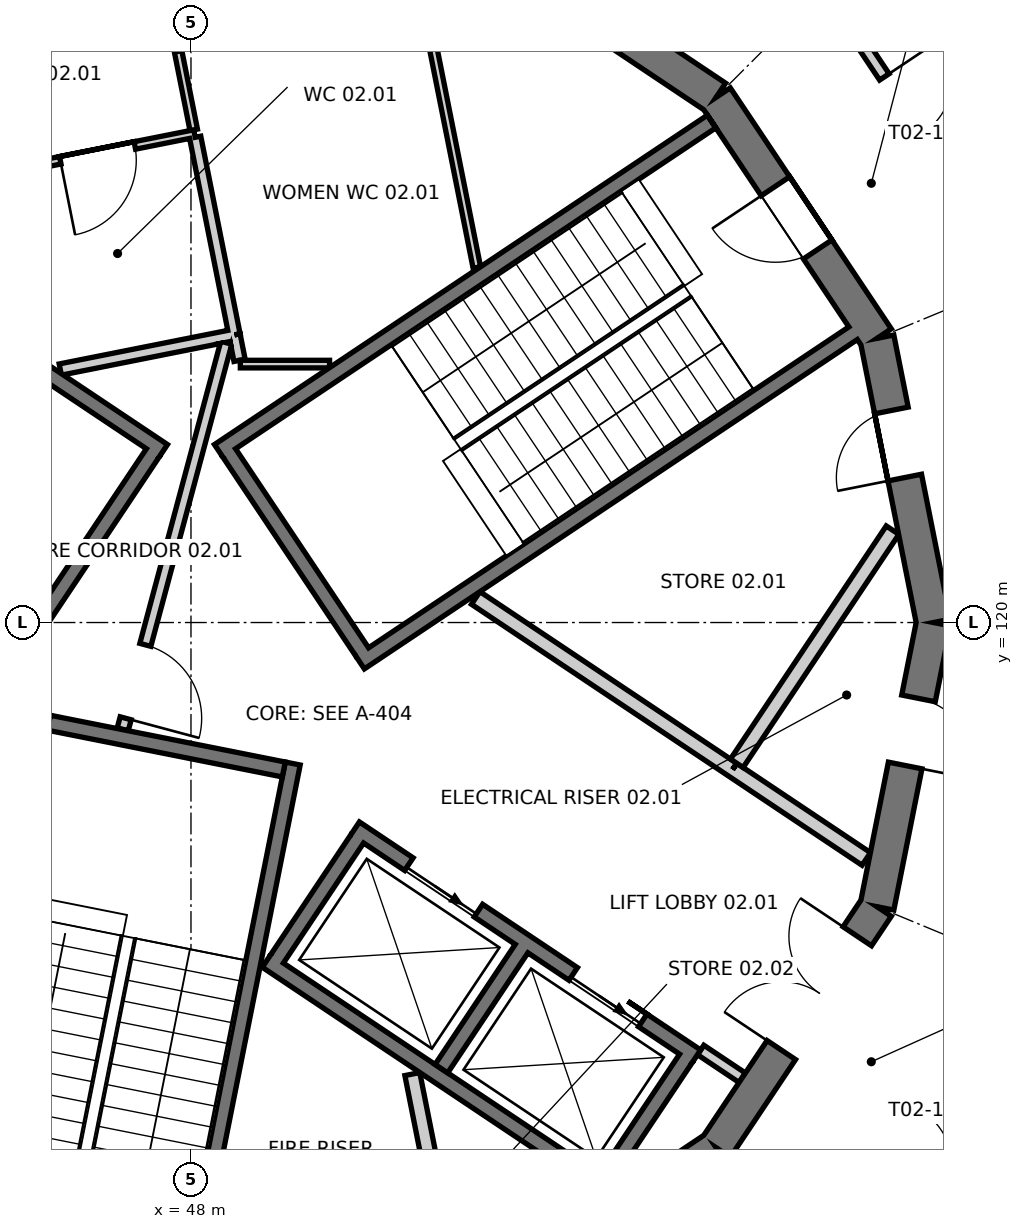
"""IFC4 building model, lengths in metres.
Left out: names, types, materials, properties, quantities, classifications, styles, units other than length and angle.
Written with IfcOpenShell. Run it as: python <this file> out.ifc"""

import sys

from ifc_helpers import new_model, si_unit, direction, frame, frame_2d, origin, place, context, subcontext, project, spatial, polyline, rectangle, outline, extrude, element, fill, save


model = new_model("IFC4")
c1 = context("Model", 3, precision=1e-05, world=origin(), true_north=direction((0.0, 1.0)))
c2 = subcontext(c1, "Body", "Model", "MODEL_VIEW")
j1 = project(units=[si_unit("LENGTHUNIT", "METRE"), si_unit("PLANEANGLEUNIT", "RADIAN")], contexts=[c1])
p1 = place(None, origin())
s1 = spatial("IfcSite", under=j1, at=p1, CompositionType="ELEMENT")
p2 = place(p1, origin())
s2 = spatial("IfcBuilding", under=s1, at=p2, CompositionType="ELEMENT")
p3 = place(p2, frame((0.0, 0.0, 10.8)))
s3 = spatial("IfcBuildingStorey", under=s2, at=p3, CompositionType="ELEMENT", Elevation=10.8)
p4 = place(p3, frame((57.771, 120.0, 0.0), z_axis=(0.0, 0.0, 1.0), x_axis=(-0.195069197673, 0.98078948206, 0.0)))
e1 = element("IfcWall", 1, at=p4, inside=s3, PredefinedType="SHEAR", context=c2, shape_type="SweptSolid", body=[
    extrude(outline(polyline([(-0.045, -0.225), (3.857, -0.225), (3.768, 0.225), (0.045, 0.225), (-0.045, -0.225)])), origin(), (0.0, 0.0, 1.0), 4.8),
])
p5 = place(p4, frame((1.945, 0.0, 0.0)))
e2 = element("IfcOpeningElement", 2, at=p5, cuts=e1, PredefinedType="OPENING", context=c2, shape_type="SweptSolid", body=[
    extrude(rectangle(XDim=0.9, YDim=2.1, at=frame_2d((0.45, 1.05))), frame((0.0, 0.235, 0.0), z_axis=(0.0, -1.0, 0.0), x_axis=(1.0, 0.0, 0.0)), (0.0, 0.0, 1.0), 0.47),
])
p6 = place(p3, frame((57.027, 123.739, 0.0), z_axis=(0.0, 0.0, 1.0), x_axis=(-0.555542277102, 0.83148829117, 0.0)))
e3 = element("IfcWall", 3, at=p6, inside=s3, PredefinedType="SHEAR", context=c2, shape_type="SweptSolid", body=[
    extrude(outline(polyline([(-0.045, -0.225), (3.857, -0.225), (3.768, 0.225), (0.045, 0.225), (-0.045, -0.225)])), origin(), (0.0, 0.0, 1.0), 4.8),
])
p7 = place(p6, frame((1.406, 0.0, 0.0)))
e4 = element("IfcOpeningElement", 4, at=p7, cuts=e3, PredefinedType="OPENING", context=c2, shape_type="SweptSolid", body=[
    extrude(rectangle(XDim=1.0, YDim=2.1, at=frame_2d((0.5, 1.05))), frame((0.0, 0.235, 0.0), z_axis=(0.0, -1.0, 0.0), x_axis=(1.0, 0.0, 0.0)), (0.0, 0.0, 1.0), 0.47),
])
p8 = place(p3, frame((54.909, 126.909, 0.0), z_axis=(0.0, 0.0, 1.0), x_axis=(-0.83148829117, 0.555542277102, 0.0)))
e5 = element("IfcWall", 5, at=p8, inside=s3, PredefinedType="SHEAR", context=c2, shape_type="SweptSolid", body=[
    extrude(outline(polyline([(-0.045, -0.225), (3.857, -0.225), (3.768, 0.225), (0.045, 0.225), (-0.045, -0.225)])), origin(), (0.0, 0.0, 1.0), 4.8),
])
p9 = place(p8, frame((1.545, 0.0, 0.0)))
e6 = element("IfcOpeningElement", 6, at=p9, cuts=e5, PredefinedType="OPENING", context=c2, shape_type="SweptSolid", body=[
    extrude(rectangle(XDim=0.9, YDim=2.1, at=frame_2d((0.45, 1.05))), frame((0.0, 0.235, 0.0), z_axis=(0.0, -1.0, 0.0), x_axis=(1.0, 0.0, 0.0)), (0.0, 0.0, 1.0), 0.47),
])
p10 = place(p3, frame((51.739, 110.973, 0.0), z_axis=(0.0, 0.0, 1.0), x_axis=(0.83148829117, 0.555542277102, 0.0)))
e7 = element("IfcWall", 7, at=p10, inside=s3, PredefinedType="SHEAR", context=c2, shape_type="SweptSolid", body=[
    extrude(outline(polyline([(-0.045, -0.225), (3.857, -0.225), (3.768, 0.225), (0.045, 0.225), (-0.045, -0.225)])), origin(), (0.0, 0.0, 1.0), 4.8),
])
p11 = place(p10, frame((0.645, 0.0, 0.0)))
e8 = element("IfcOpeningElement", 8, at=p11, cuts=e7, PredefinedType="OPENING", context=c2, shape_type="SweptSolid", body=[
    extrude(rectangle(XDim=0.9, YDim=2.1, at=frame_2d((0.45, 1.05))), frame((0.0, 0.235, 0.0), z_axis=(0.0, -1.0, 0.0), x_axis=(1.0, 0.0, 0.0)), (0.0, 0.0, 1.0), 0.47),
])
p12 = place(p3, frame((54.909, 113.091, 0.0), z_axis=(0.0, 0.0, 1.0), x_axis=(0.555542277102, 0.83148829117, 0.0)))
e9 = element("IfcWall", 9, at=p12, inside=s3, PredefinedType="SHEAR", context=c2, shape_type="SweptSolid", body=[
    extrude(outline(polyline([(-0.045, -0.225), (3.857, -0.225), (3.768, 0.225), (0.045, 0.225), (-0.045, -0.225)])), origin(), (0.0, 0.0, 1.0), 4.8),
])
p13 = place(p12, frame((1.545, 0.0, 0.0)))
e10 = element("IfcOpeningElement", 10, at=p13, cuts=e9, PredefinedType="OPENING", context=c2, shape_type="SweptSolid", body=[
    extrude(rectangle(XDim=1.8, YDim=2.1, at=frame_2d((0.9, 1.05))), frame((0.0, 0.235, 0.0), z_axis=(0.0, -1.0, 0.0), x_axis=(1.0, 0.0, 0.0)), (0.0, 0.0, 1.0), 0.47),
])
p14 = place(p3, frame((57.027, 116.261, 0.0), z_axis=(0.0, 0.0, 1.0), x_axis=(0.195069197673, 0.98078948206, 0.0)))
e11 = element("IfcWall", 11, at=p14, inside=s3, PredefinedType="SHEAR", context=c2, shape_type="SweptSolid", body=[
    extrude(outline(polyline([(-0.045, -0.225), (3.857, -0.225), (3.768, 0.225), (0.045, 0.225), (-0.045, -0.225)])), origin(), (0.0, 0.0, 1.0), 4.8),
])
p15 = place(p14, frame((1.895, 0.0, 0.0)))
e12 = element("IfcOpeningElement", 12, at=p15, cuts=e11, PredefinedType="OPENING", context=c2, shape_type="SweptSolid", body=[
    extrude(rectangle(XDim=0.9, YDim=2.1, at=frame_2d((0.45, 1.05))), frame((0.0, 0.235, 0.0), z_axis=(0.0, -1.0, 0.0), x_axis=(1.0, 0.0, 0.0)), (0.0, 0.0, 1.0), 0.47),
])
p16 = place(p3, frame((48.365, 122.258, 0.0), z_axis=(0.0, 0.0, 1.0), x_axis=(0.831476803301, 0.555559470779, 0.0)))
e13 = element("IfcWall", 13, at=p16, inside=s3, PredefinedType="SHEAR", context=c2, shape_type="SweptSolid", body=[
    extrude(rectangle(XDim=7.8, YDim=0.2, at=frame_2d((3.9, 0.0))), origin(), (0.0, 0.0, 1.0), 4.8),
])
p17 = place(p3, frame((50.226, 119.473, 0.0), z_axis=(0.0, 0.0, 1.0), x_axis=(0.831486463828, 0.555545012102, 0.0)))
e14 = element("IfcWall", 14, at=p17, inside=s3, PredefinedType="SHEAR", context=c2, shape_type="SweptSolid", body=[
    extrude(rectangle(XDim=7.8, YDim=0.2, at=frame_2d((3.9, 0.0))), origin(), (0.0, 0.0, 1.0), 4.8),
])
p18 = place(p3, frame((50.253, 119.612, 0.0), z_axis=(0.0, 0.0, 1.0), x_axis=(-0.55555842186, 0.831477504146, 0.0)))
e15 = element("IfcWall", 15, at=p18, inside=s3, PredefinedType="SHEAR", context=c2, shape_type="SweptSolid", body=[
    extrude(rectangle(XDim=3.15, YDim=0.2, at=frame_2d((1.575, 0.0))), origin(), (0.0, 0.0, 1.0), 4.8),
])
p19 = place(p3, frame((47.635, 122.258, 0.0), z_axis=(0.0, 0.0, 1.0), x_axis=(-0.831476803301, 0.555559470779, 0.0)))
e16 = element("IfcWall", 16, at=p19, inside=s3, PredefinedType="SHEAR", context=c2, shape_type="SweptSolid", body=[
    extrude(rectangle(XDim=7.8, YDim=0.2, at=frame_2d((3.9, 0.0))), origin(), (0.0, 0.0, 1.0), 4.8),
])
p20 = place(p3, frame((47.497, 122.231, 0.0), z_axis=(0.0, 0.0, 1.0), x_axis=(-0.55555842186, -0.831477504146, 0.0)))
e17 = element("IfcWall", 17, at=p20, inside=s3, PredefinedType="SHEAR", context=c2, shape_type="SweptSolid", body=[
    extrude(rectangle(XDim=3.15, YDim=0.2, at=frame_2d((1.575, 0.0))), origin(), (0.0, 0.0, 1.0), 4.8),
])
p21 = place(p3, frame((49.339, 118.145, 0.0), z_axis=(0.0, 0.0, 1.0), x_axis=(-0.195092759861, -0.980784795483, 0.0)))
e18 = element("IfcWall", 18, at=p21, inside=s3, PredefinedType="SHEAR", context=c2, shape_type="SweptSolid", body=[
    extrude(rectangle(XDim=7.8, YDim=0.2, at=frame_2d((3.9, 0.0))), origin(), (0.0, 0.0, 1.0), 4.8),
])
p22 = place(p3, frame((46.132, 118.681, 0.0), z_axis=(0.0, 0.0, 1.0), x_axis=(0.980785830564, -0.195087556151, 0.0)))
e19 = element("IfcWall", 19, at=p22, inside=s3, PredefinedType="SHEAR", context=c2, shape_type="SweptSolid", body=[
    extrude(rectangle(XDim=3.15, YDim=0.2, at=frame_2d((1.575, 0.0))), origin(), (0.0, 0.0, 1.0), 4.8),
])
p23 = place(p3, frame((50.16, 117.293, 0.0), z_axis=(0.0, 0.0, 1.0), x_axis=(0.831479497601, -0.55555543834, 0.0)))
e20 = element("IfcWall", 20, at=p23, inside=s3, PredefinedType="SHEAR", context=c2, shape_type="SweptSolid", body=[
    extrude(rectangle(XDim=5.4, YDim=0.2, at=frame_2d((2.7, 0.0))), origin(), (0.0, 0.0, 1.0), 4.8),
])
p24 = place(p23, frame((0.85, 0.0, 0.0)))
e21 = element("IfcOpeningElement", 21, at=p24, cuts=e20, PredefinedType="OPENING", context=c2, shape_type="SweptSolid", body=[
    extrude(rectangle(XDim=1.1, YDim=2.1, at=frame_2d((0.55, 1.05))), frame((0.0, 0.11, 0.0), z_axis=(0.0, -1.0, 0.0), x_axis=(1.0, 0.0, 0.0)), (0.0, 0.0, 1.0), 0.22),
])
p25 = place(p23, frame((3.45, 0.0, 0.0)))
e22 = element("IfcOpeningElement", 22, at=p25, cuts=e20, PredefinedType="OPENING", context=c2, shape_type="SweptSolid", body=[
    extrude(rectangle(XDim=1.1, YDim=2.1, at=frame_2d((0.55, 1.05))), frame((0.0, 0.11, 0.0), z_axis=(0.0, -1.0, 0.0), x_axis=(1.0, 0.0, 0.0)), (0.0, 0.0, 1.0), 0.22),
])
p26 = place(p3, frame((48.994, 115.548, 0.0), z_axis=(0.0, 0.0, 1.0), x_axis=(0.831444656906, -0.555607579593, 0.0)))
e23 = element("IfcWall", 23, at=p26, inside=s3, PredefinedType="SHEAR", context=c2, shape_type="SweptSolid", body=[
    extrude(rectangle(XDim=5.4, YDim=0.2, at=frame_2d((2.7, 0.0))), origin(), (0.0, 0.0, 1.0), 4.8),
])
p27 = place(p3, frame((50.188, 117.155, 0.0), z_axis=(0.0, 0.0, 1.0), x_axis=(-0.555559945722, -0.831476485963, 0.0)))
e24 = element("IfcWall", 24, at=p27, inside=s3, PredefinedType="SHEAR", context=c2, shape_type="SweptSolid", body=[
    extrude(rectangle(XDim=1.9, YDim=0.2, at=frame_2d((0.95, 0.0))), origin(), (0.0, 0.0, 1.0), 4.8),
])
p28 = place(p3, frame((52.35, 115.71, 0.0), z_axis=(0.0, 0.0, 1.0), x_axis=(-0.55550058618, -0.831516144614, 0.0)))
e25 = element("IfcWall", 25, at=p28, inside=s3, PredefinedType="SHEAR", context=c2, shape_type="SweptSolid", body=[
    extrude(rectangle(XDim=1.9, YDim=0.2, at=frame_2d((0.95, 0.0))), origin(), (0.0, 0.0, 1.0), 4.8),
])
p29 = place(p3, frame((54.512, 114.266, 0.0), z_axis=(0.0, 0.0, 1.0), x_axis=(-0.555589423235, -0.83145678949, 0.0)))
e26 = element("IfcWall", 26, at=p29, inside=s3, PredefinedType="SHEAR", context=c2, shape_type="SweptSolid", body=[
    extrude(rectangle(XDim=1.9, YDim=0.2, at=frame_2d((0.95, 0.0))), origin(), (0.0, 0.0, 1.0), 4.8),
])
p30 = place(p3, frame((55.126, 118.065, 0.0), z_axis=(0.0, 0.0, 1.0), x_axis=(-0.831495502265, 0.555531483998, 0.0)))
e27 = element("IfcWall", 27, at=p30, inside=s3, PredefinedType="SOLIDWALL", context=c2, shape_type="SweptSolid", body=[
    extrude(rectangle(XDim=4.065, YDim=0.2, at=frame_2d((2.033, 0.0))), origin(), (0.0, 0.0, 1.0), 4.52),
])
p31 = place(p3, frame((57.231, 121.215, 0.0), z_axis=(0.0, 0.0, 1.0), x_axis=(-0.555600969312, -0.831449074147, 0.0)))
e28 = element("IfcWall", 28, at=p31, inside=s3, PredefinedType="SOLIDWALL", context=c2, shape_type="SweptSolid", body=[
    extrude(rectangle(XDim=3.689, YDim=0.2, at=frame_2d((1.844, 0.0))), origin(), (0.0, 0.0, 1.0), 4.52),
])
p32 = place(p3, frame((56.885, 116.89, 0.0), z_axis=(0.0, 0.0, 1.0), x_axis=(-0.831446094913, 0.555605427667, 0.0)))
e29 = element("IfcWall", 29, at=p32, inside=s3, PredefinedType="SOLIDWALL", context=c2, shape_type="SweptSolid", body=[
    extrude(rectangle(XDim=2.115, YDim=0.2, at=frame_2d((1.058, 0.0))), origin(), (0.0, 0.0, 1.0), 4.52),
])
p33 = place(p3, frame((48.046, 126.433, 0.0), z_axis=(0.0, 0.0, 1.0), x_axis=(-0.980778805994, -0.195122868248, 0.0)))
e30 = element("IfcWall", 30, at=p33, inside=s3, PredefinedType="PARTITIONING", context=c2, shape_type="SweptSolid", body=[
    extrude(rectangle(XDim=2.6, YDim=0.1, at=frame_2d((1.3, 0.0))), origin(), (0.0, 0.0, 1.0), 4.52),
])
p34 = place(p33, frame((0.8, 0.0, 0.0)))
e31 = element("IfcOpeningElement", 31, at=p34, cuts=e30, PredefinedType="OPENING", context=c2, shape_type="SweptSolid", body=[
    extrude(rectangle(XDim=1.0, YDim=2.1, at=frame_2d((0.5, 1.05))), frame((0.0, 0.06, 0.0), z_axis=(0.0, -1.0, 0.0), x_axis=(1.0, 0.0, 0.0)), (0.0, 0.0, 1.0), 0.12),
])
p35 = place(p3, frame((47.449, 129.432, 0.0), z_axis=(0.0, 0.0, 1.0), x_axis=(0.195054549846, -0.980792395252, 0.0)))
e32 = element("IfcWall", 32, at=p35, inside=s3, PredefinedType="PARTITIONING", context=c2, shape_type="SweptSolid", body=[
    extrude(rectangle(XDim=3.008, YDim=0.1, at=frame_2d((1.504, 0.0))), origin(), (0.0, 0.0, 1.0), 4.52),
])
p36 = place(p35, frame((1.054, 0.0, 0.0)))
e33 = element("IfcOpeningElement", 33, at=p36, cuts=e32, PredefinedType="OPENING", context=c2, shape_type="SweptSolid", body=[
    extrude(rectangle(XDim=0.9, YDim=2.1, at=frame_2d((0.45, 1.05))), frame((0.0, 0.06, 0.0), z_axis=(0.0, -1.0, 0.0), x_axis=(1.0, 0.0, 0.0)), (0.0, 0.0, 1.0), 0.12),
])
p37 = place(p3, frame((48.056, 126.384, 0.0), z_axis=(0.0, 0.0, 1.0), x_axis=(0.195123903338, -0.980778600065, 0.0)))
e34 = element("IfcWall", 34, at=p37, inside=s3, PredefinedType="PARTITIONING", context=c2, shape_type="SweptSolid", body=[
    extrude(rectangle(XDim=2.65, YDim=0.15, at=frame_2d((1.325, 0.0))), origin(), (0.0, 0.0, 1.0), 4.52),
])
p38 = place(p3, frame((48.524, 123.775, 0.0), z_axis=(0.0, 0.0, 1.0), x_axis=(-0.980777249161, -0.195130693455, 0.0)))
e35 = element("IfcWall", 35, at=p38, inside=s3, PredefinedType="PARTITIONING", context=c2, shape_type="SweptSolid", body=[
    extrude(rectangle(XDim=2.287, YDim=0.15, at=frame_2d((1.144, 0.0))), origin(), (0.0, 0.0, 1.0), 4.52),
])
p39 = place(p3, frame((50.911, 128.943, 0.0), z_axis=(0.0, 0.0, 1.0), x_axis=(0.195113868301, -0.980780596462, 0.0)))
e36 = element("IfcWall", 36, at=p39, inside=s3, PredefinedType="PARTITIONING", context=c2, shape_type="SweptSolid", body=[
    extrude(rectangle(XDim=4.357, YDim=0.1, at=frame_2d((2.178, 0.0))), origin(), (0.0, 0.0, 1.0), 4.52),
])
p40 = place(p3, frame((49.823, 123.4, 0.0), z_axis=(0.0, 0.0, 1.0), x_axis=(-1.0, 0.0, 0.0)))
e37 = element("IfcWall", 37, at=p40, inside=s3, PredefinedType="PARTITIONING", context=c2, shape_type="SweptSolid", body=[
    extrude(rectangle(XDim=1.174, YDim=0.1, at=frame_2d((0.587, 0.0))), origin(), (0.0, 0.0, 1.0), 4.52),
])
p41 = place(p3, frame((48.639, 123.449, 0.0), z_axis=(0.0, 0.0, 1.0), x_axis=(-0.194880473507, 0.98082699853, 0.0)))
e38 = element("IfcWall", 38, at=p41, inside=s3, PredefinedType="PARTITIONING", context=c2, shape_type="SweptSolid", body=[
    extrude(rectangle(XDim=0.342, YDim=0.15, at=frame_2d((0.171, 0.0))), origin(), (0.0, 0.0, 1.0), 4.52),
])
p42 = place(p3, frame((50.912, 114.059, 0.0), z_axis=(0.0, 0.0, 1.0), x_axis=(0.195101986683, -0.980782960085, 0.0)))
e39 = element("IfcWall", 39, at=p42, inside=s3, PredefinedType="SOLIDWALL", context=c2, shape_type="SweptSolid", body=[
    extrude(rectangle(XDim=2.963, YDim=0.2, at=frame_2d((1.481, 0.0))), origin(), (0.0, 0.0, 1.0), 4.52),
])
p43 = place(p3, frame((54.706, 114.377, 0.0), z_axis=(0.0, 0.0, 1.0), x_axis=(0.831421626399, -0.555642042286, 0.0)))
e40 = element("IfcWall", 40, at=p43, inside=s3, PredefinedType="PARTITIONING", context=c2, shape_type="SweptSolid", body=[
    extrude(rectangle(XDim=0.658, YDim=0.15, at=frame_2d((0.329, 0.0))), origin(), (0.0, 0.0, 1.0), 4.52),
])
p44 = place(p3, frame((47.102, 118.595, 0.0), z_axis=(0.0, 0.0, 1.0), x_axis=(0.258814124304, 0.9659271448, 0.0)))
e41 = element("IfcWall", 41, at=p44, inside=s3, PredefinedType="PARTITIONING", context=c2, shape_type="SweptSolid", body=[
    extrude(rectangle(XDim=5.265, YDim=0.15, at=frame_2d((2.632, 0.0))), origin(), (0.0, 0.0, 1.0), 4.52),
])
p45 = place(p44, frame((0.15, 0.0, 0.0)))
e42 = element("IfcOpeningElement", 42, at=p45, cuts=e41, PredefinedType="OPENING", context=c2, shape_type="SweptSolid", body=[
    extrude(rectangle(XDim=1.0, YDim=2.1, at=frame_2d((0.5, 1.05))), frame((0.0, 0.085, 0.0), z_axis=(0.0, -1.0, 0.0), x_axis=(1.0, 0.0, 0.0)), (0.0, 0.0, 1.0), 0.17),
])
p46 = place(p3, frame((56.344, 128.344, 0.0), z_axis=(0.0, 0.0, 1.0), x_axis=(0.555544233776, -0.831486983854, 0.0)))
e43 = element("IfcWall", 43, at=p46, inside=s3, PredefinedType="PARTITIONING", context=c2, shape_type="SweptSolid", body=[
    extrude(rectangle(XDim=4.604, YDim=0.15, at=frame_2d((2.302, 0.0))), origin(), (0.0, 0.0, 1.0), 4.52),
])
p47 = place(p46, frame((1.402, 0.0, 0.0)))
e44 = element("IfcOpeningElement", 44, at=p47, cuts=e43, PredefinedType="OPENING", context=c2, shape_type="SweptSolid", body=[
    extrude(rectangle(XDim=1.8, YDim=2.1, at=frame_2d((0.9, 1.05))), frame((0.0, 0.085, 0.0), z_axis=(0.0, -1.0, 0.0), x_axis=(1.0, 0.0, 0.0)), (0.0, 0.0, 1.0), 0.17),
])
p48 = place(p3, frame((58.902, 115.484, 0.0), z_axis=(0.0, 0.0, 1.0), x_axis=(-0.555544233776, -0.831486983854, 0.0)))
e45 = element("IfcWall", 45, at=p48, inside=s3, PredefinedType="PARTITIONING", context=c2, shape_type="SweptSolid", body=[
    extrude(rectangle(XDim=4.604, YDim=0.15, at=frame_2d((2.302, 0.0))), origin(), (0.0, 0.0, 1.0), 4.52),
])
p49 = place(p48, frame((1.402, 0.0, 0.0)))
e46 = element("IfcOpeningElement", 46, at=p49, cuts=e45, PredefinedType="OPENING", context=c2, shape_type="SweptSolid", body=[
    extrude(rectangle(XDim=1.8, YDim=2.1, at=frame_2d((0.9, 1.05))), frame((0.0, 0.085, 0.0), z_axis=(0.0, -1.0, 0.0), x_axis=(1.0, 0.0, 0.0)), (0.0, 0.0, 1.0), 0.17),
])
p50 = place(p7, origin())
e47 = element("IfcDoor", 47, at=p50, inside=s3, OperationType="SINGLE_SWING_RIGHT", PredefinedType="DOOR", context=c2, shape_type="SweptSolid", body=[
    extrude(rectangle(XDim=1.0, YDim=2.1, at=frame_2d((0.5, 1.05))), frame((0.0, 0.025, 0.0), z_axis=(0.0, -1.0, 0.0), x_axis=(1.0, 0.0, 0.0)), (0.0, 0.0, 1.0), 0.05),
])
fill(e4, e47)
p51 = place(p24, origin())
e48 = element("IfcDoor", 48, at=p51, inside=s3, OperationType="SLIDING_TO_LEFT", PredefinedType="DOOR", context=c2, shape_type="SweptSolid", body=[
    extrude(rectangle(XDim=1.1, YDim=2.1, at=frame_2d((0.55, 1.05))), frame((0.0, 0.025, 0.0), z_axis=(0.0, -1.0, 0.0), x_axis=(1.0, 0.0, 0.0)), (0.0, 0.0, 1.0), 0.05),
])
fill(e21, e48)
p52 = place(p25, origin())
e49 = element("IfcDoor", 49, at=p52, inside=s3, OperationType="SLIDING_TO_LEFT", PredefinedType="DOOR", context=c2, shape_type="SweptSolid", body=[
    extrude(rectangle(XDim=1.1, YDim=2.1, at=frame_2d((0.55, 1.05))), frame((0.0, 0.025, 0.0), z_axis=(0.0, -1.0, 0.0), x_axis=(1.0, 0.0, 0.0)), (0.0, 0.0, 1.0), 0.05),
])
fill(e22, e49)
p53 = place(p5, origin())
e50 = element("IfcDoor", 50, at=p53, inside=s3, OperationType="SINGLE_SWING_LEFT", PredefinedType="DOOR", context=c2, shape_type="SweptSolid", body=[
    extrude(rectangle(XDim=0.9, YDim=2.1, at=frame_2d((0.45, 1.05))), frame((0.0, 0.025, 0.0), z_axis=(0.0, -1.0, 0.0), x_axis=(1.0, 0.0, 0.0)), (0.0, 0.0, 1.0), 0.05),
])
fill(e2, e50)
p54 = place(p15, frame((0.9, 0.0, 0.0), z_axis=(0.0, 0.0, 1.0), x_axis=(-1.0, 0.0, 0.0)))
e51 = element("IfcDoor", 51, at=p54, inside=s3, OperationType="SINGLE_SWING_RIGHT", PredefinedType="DOOR", context=c2, shape_type="SweptSolid", body=[
    extrude(rectangle(XDim=0.9, YDim=2.1, at=frame_2d((0.45, 1.05))), frame((0.0, 0.025, 0.0), z_axis=(0.0, -1.0, 0.0), x_axis=(1.0, 0.0, 0.0)), (0.0, 0.0, 1.0), 0.05),
])
fill(e12, e51)
p55 = place(p13, origin())
e52 = element("IfcDoor", 52, at=p55, inside=s3, OperationType="DOUBLE_DOOR_SINGLE_SWING", PredefinedType="DOOR", context=c2, shape_type="SweptSolid", body=[
    extrude(rectangle(XDim=1.8, YDim=2.1, at=frame_2d((0.9, 1.05))), frame((0.0, 0.025, 0.0), z_axis=(0.0, -1.0, 0.0), x_axis=(1.0, 0.0, 0.0)), (0.0, 0.0, 1.0), 0.05),
])
fill(e10, e52)
p56 = place(p34, origin())
e53 = element("IfcDoor", 53, at=p56, inside=s3, OperationType="SINGLE_SWING_RIGHT", PredefinedType="DOOR", context=c2, shape_type="SweptSolid", body=[
    extrude(rectangle(XDim=1.0, YDim=2.1, at=frame_2d((0.5, 1.05))), frame((0.0, 0.025, 0.0), z_axis=(0.0, -1.0, 0.0), x_axis=(1.0, 0.0, 0.0)), (0.0, 0.0, 1.0), 0.05),
])
fill(e31, e53)
p57 = place(p45, frame((1.0, 0.0, 0.0), z_axis=(0.0, 0.0, 1.0), x_axis=(-1.0, 0.0, 0.0)))
e54 = element("IfcDoor", 54, at=p57, inside=s3, OperationType="SINGLE_SWING_RIGHT", PredefinedType="DOOR", context=c2, shape_type="SweptSolid", body=[
    extrude(rectangle(XDim=1.0, YDim=2.1, at=frame_2d((0.5, 1.05))), frame((0.0, 0.025, 0.0), z_axis=(0.0, -1.0, 0.0), x_axis=(1.0, 0.0, 0.0)), (0.0, 0.0, 1.0), 0.05),
])
fill(e42, e54)
p58 = place(p49, origin())
e55 = element("IfcDoor", 55, at=p58, inside=s3, OperationType="DOUBLE_DOOR_SINGLE_SWING", PredefinedType="DOOR", context=c2, shape_type="SweptSolid", body=[
    extrude(rectangle(XDim=1.8, YDim=2.1, at=frame_2d((0.9, 1.05))), frame((0.0, 0.025, 0.0), z_axis=(0.0, -1.0, 0.0), x_axis=(1.0, 0.0, 0.0)), (0.0, 0.0, 1.0), 0.05),
])
fill(e46, e55)
p59 = place(p47, origin())
e56 = element("IfcDoor", 56, at=p59, inside=s3, OperationType="DOUBLE_DOOR_SINGLE_SWING", PredefinedType="DOOR", context=c2, shape_type="SweptSolid", body=[
    extrude(rectangle(XDim=1.8, YDim=2.1, at=frame_2d((0.9, 1.05))), frame((0.0, 0.025, 0.0), z_axis=(0.0, -1.0, 0.0), x_axis=(1.0, 0.0, 0.0)), (0.0, 0.0, 1.0), 0.05),
])
fill(e44, e56)
save(model, sys.argv[1])
